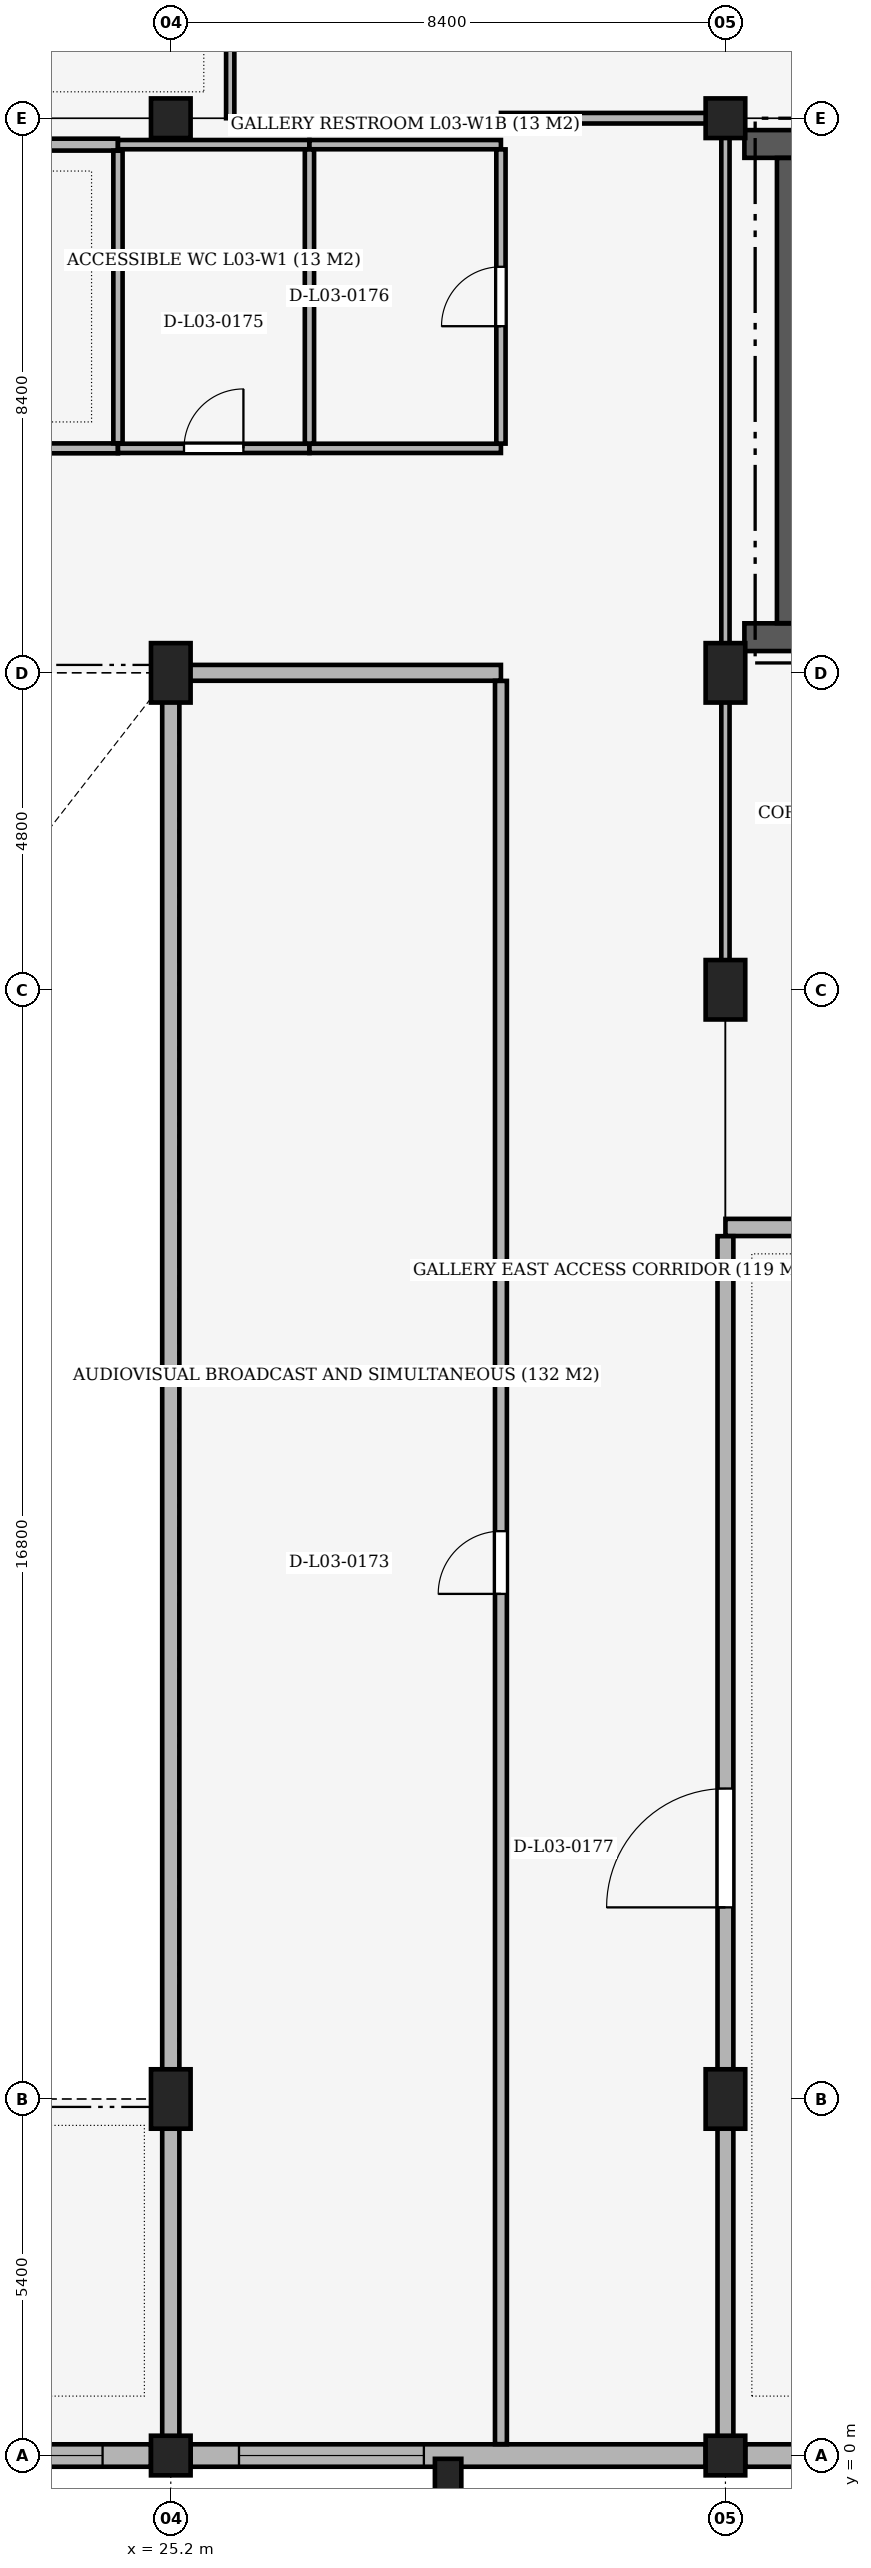
"""IFC4 building model, lengths in metres.
Left out: names, types, materials, properties, quantities, classifications, styles, units other than length and angle.
Written with IfcOpenShell. Run it as: python <this file> out.ifc"""

import sys

from ifc_helpers import new_model, si_unit, direction, frame, frame_2d, origin, origin_2d, place, context, subcontext, project, spatial, rectangle, extrude, element, fill, save


model = new_model("IFC4")
c1 = context("Model", 3, precision=1e-05, world=origin(), true_north=direction((0.0, 1.0)))
c2 = subcontext(c1, "Body", "Model", "MODEL_VIEW")
j1 = project(units=[si_unit("LENGTHUNIT", "METRE"), si_unit("PLANEANGLEUNIT", "RADIAN")], contexts=[c1])
p1 = place(None, origin())
s1 = spatial("IfcSite", under=j1, at=p1, CompositionType="ELEMENT")
p2 = place(p1, origin())
s2 = spatial("IfcBuilding", under=s1, at=p2, CompositionType="ELEMENT")
p3 = place(p2, frame((0.0, 0.0, 15.3)))
s3 = spatial("IfcBuildingStorey", under=s2, at=p3, CompositionType="ELEMENT", Elevation=15.3)
p4 = place(p3, frame((25.2, 0.0, 0.0), z_axis=(0.0, 0.0, 1.0), x_axis=(1.0, 0.0, 0.0)))
e1 = element("IfcColumn", 1, at=p4, inside=s3, PredefinedType="COLUMN", context=c2, shape_type="SweptSolid", body=[
    extrude(rectangle(XDim=0.6, YDim=0.6, at=origin_2d()), origin(), (0.0, 0.0, 1.0), 5.1),
])
for number, where, z_axis, x_axis in (
    (2, (25.2, 5.4, 0.0), (0.0, 0.0, 1.0), (1.0, 0.0, 0.0)),
    (3, (25.2, 27.0, 0.0), (0.0, 0.0, 1.0), (1.0, 0.0, 0.0)),
):
    element("IfcColumn", number, at=place(p3, frame(where, z_axis=z_axis, x_axis=x_axis)), inside=s3, PredefinedType="COLUMN", context=c2, shape_type="SweptSolid", body=[
        extrude(rectangle(XDim=0.6, YDim=0.9, at=origin_2d()), origin(), (0.0, 0.0, 1.0), 5.1),
    ])
for number, where, z_axis, x_axis in (
    (4, (25.2, 35.4, 0.0), (0.0, 0.0, 1.0), (1.0, 0.0, 0.0)),
    (5, (33.6, 0.0, 0.0), (0.0, 0.0, 1.0), (1.0, 0.0, 0.0)),
):
    element("IfcColumn", number, at=place(p3, frame(where, z_axis=z_axis, x_axis=x_axis)), inside=s3, PredefinedType="COLUMN", context=c2, shape_type="SweptSolid", body=[
        extrude(rectangle(XDim=0.6, YDim=0.6, at=origin_2d()), origin(), (0.0, 0.0, 1.0), 5.1),
    ])
for number, where, z_axis, x_axis in (
    (6, (33.6, 5.4, 0.0), (0.0, 0.0, 1.0), (1.0, 0.0, 0.0)),
    (7, (33.6, 22.2, 0.0), (0.0, 0.0, 1.0), (1.0, 0.0, 0.0)),
    (8, (33.6, 27.0, 0.0), (0.0, 0.0, 1.0), (1.0, 0.0, 0.0)),
):
    element("IfcColumn", number, at=place(p3, frame(where, z_axis=z_axis, x_axis=x_axis)), inside=s3, PredefinedType="COLUMN", context=c2, shape_type="SweptSolid", body=[
        extrude(rectangle(XDim=0.6, YDim=0.9, at=origin_2d()), origin(), (0.0, 0.0, 1.0), 5.1),
    ])
p5 = place(p3, frame((33.6, 35.4, 0.0), z_axis=(0.0, 0.0, 1.0), x_axis=(1.0, 0.0, 0.0)))
e9 = element("IfcColumn", 9, at=p5, inside=s3, PredefinedType="COLUMN", context=c2, shape_type="SweptSolid", body=[
    extrude(rectangle(XDim=0.6, YDim=0.6, at=origin_2d()), origin(), (0.0, 0.0, 1.0), 5.1),
])
p6 = place(p3, frame((29.4, -0.35, 0.0), z_axis=(0.0, 0.0, 1.0), x_axis=(1.0, 0.0, 0.0)))
e10 = element("IfcColumn", 10, at=p6, inside=s3, PredefinedType="PILASTER", context=c2, shape_type="SweptSolid", body=[
    extrude(rectangle(XDim=0.4, YDim=0.6, at=origin_2d()), origin(), (0.0, 0.0, 1.0), 5.1),
])
p7 = place(p3, frame((41.7, 0.0, 0.0), z_axis=(0.0, 0.0, 1.0), x_axis=(-1.0, 0.0, 0.0)))
e11 = element("IfcWall", 11, at=p7, inside=s3, PredefinedType="SOLIDWALL", context=c2, shape_type="SweptSolid", body=[
    extrude(rectangle(XDim=7.8, YDim=0.34, at=frame_2d((3.9, 0.0))), origin(), (0.0, 0.0, 1.0), 4.14),
])
p8 = place(p7, frame((1.0, 0.0, 0.85)))
e12 = element("IfcOpeningElement", 12, at=p8, cuts=e11, PredefinedType="OPENING", context=c2, shape_type="SweptSolid", body=[
    extrude(rectangle(XDim=2.4, YDim=2.4, at=frame_2d((1.2, 1.2))), frame((0.0, 0.185, 0.0), z_axis=(0.0, -1.0, 0.0), x_axis=(1.0, 0.0, 0.0)), (0.0, 0.0, 1.0), 0.37),
])
p9 = place(p7, frame((4.4, 0.0, 0.85)))
e13 = element("IfcOpeningElement", 13, at=p9, cuts=e11, PredefinedType="OPENING", context=c2, shape_type="SweptSolid", body=[
    extrude(rectangle(XDim=2.4, YDim=2.4, at=frame_2d((1.2, 1.2))), frame((0.0, 0.185, 0.0), z_axis=(0.0, -1.0, 0.0), x_axis=(1.0, 0.0, 0.0)), (0.0, 0.0, 1.0), 0.37),
])
p10 = place(p3, frame((33.3, 0.0, 0.0), z_axis=(0.0, 0.0, 1.0), x_axis=(-1.0, 0.0, 0.0)))
e14 = element("IfcWall", 14, at=p10, inside=s3, PredefinedType="SOLIDWALL", context=c2, shape_type="SweptSolid", body=[
    extrude(rectangle(XDim=7.8, YDim=0.34, at=frame_2d((3.9, 0.0))), origin(), (0.0, 0.0, 1.0), 4.14),
])
p11 = place(p10, frame((4.267, 0.0, 0.75)))
e15 = element("IfcOpeningElement", 15, at=p11, cuts=e14, PredefinedType="OPENING", context=c2, shape_type="SweptSolid", body=[
    extrude(rectangle(XDim=2.8, YDim=2.6, at=frame_2d((1.4, 1.3))), frame((0.0, 0.185, 0.0), z_axis=(0.0, -1.0, 0.0), x_axis=(1.0, 0.0, 0.0)), (0.0, 0.0, 1.0), 0.37),
])
p12 = place(p3, frame((24.9, 0.0, 0.0), z_axis=(0.0, 0.0, 1.0), x_axis=(-1.0, 0.0, 0.0)))
e16 = element("IfcWall", 16, at=p12, inside=s3, PredefinedType="SOLIDWALL", context=c2, shape_type="SweptSolid", body=[
    extrude(rectangle(XDim=7.8, YDim=0.34, at=frame_2d((3.9, 0.0))), origin(), (0.0, 0.0, 1.0), 4.14),
])
p13 = place(p12, frame((0.733, 0.0, 0.75)))
e17 = element("IfcOpeningElement", 17, at=p13, cuts=e16, PredefinedType="OPENING", context=c2, shape_type="SweptSolid", body=[
    extrude(rectangle(XDim=2.8, YDim=2.6, at=frame_2d((1.4, 1.3))), frame((0.0, 0.185, 0.0), z_axis=(0.0, -1.0, 0.0), x_axis=(1.0, 0.0, 0.0)), (0.0, 0.0, 1.0), 0.37),
])
p14 = place(p12, frame((4.267, 0.0, 0.75)))
e18 = element("IfcOpeningElement", 18, at=p14, cuts=e16, PredefinedType="OPENING", context=c2, shape_type="SweptSolid", body=[
    extrude(rectangle(XDim=2.8, YDim=2.6, at=frame_2d((1.4, 1.3))), frame((0.0, 0.185, 0.0), z_axis=(0.0, -1.0, 0.0), x_axis=(1.0, 0.0, 0.0)), (0.0, 0.0, 1.0), 0.37),
])
p15 = place(p3, frame((33.887, 35.01, 0.0), z_axis=(0.0, 0.0, 1.0), x_axis=(1.0, 0.0, 0.0)))
e19 = element("IfcWall", 19, at=p15, inside=s3, PredefinedType="SHEAR", context=c2, shape_type="SweptSolid", body=[
    extrude(rectangle(XDim=4.733, YDim=0.42, at=frame_2d((2.367, 0.0))), origin(), (0.0, 0.0, 1.0), 4.84),
])
p16 = place(p3, frame((33.887, 27.54, 0.0), z_axis=(0.0, 0.0, 1.0), x_axis=(1.0, 0.0, 0.0)))
e20 = element("IfcWall", 20, at=p16, inside=s3, PredefinedType="SHEAR", context=c2, shape_type="SweptSolid", body=[
    extrude(rectangle(XDim=4.733, YDim=0.42, at=frame_2d((2.367, 0.0))), origin(), (0.0, 0.0, 1.0), 4.84),
])
p17 = place(p16, frame((2.013, 0.0, 0.0)))
e21 = element("IfcOpeningElement", 21, at=p17, cuts=e20, PredefinedType="OPENING", context=c2, shape_type="SweptSolid", body=[
    extrude(rectangle(XDim=1.2, YDim=2.2, at=frame_2d((0.6, 1.1))), frame((0.0, 0.225, 0.0), z_axis=(0.0, -1.0, 0.0), x_axis=(1.0, 0.0, 0.0)), (0.0, 0.0, 1.0), 0.45),
])
p18 = place(p3, frame((34.59, 27.752, 0.0), z_axis=(0.0, 0.0, 1.0), x_axis=(0.0, 1.0, 0.0)))
e22 = element("IfcWall", 22, at=p18, inside=s3, PredefinedType="SHEAR", context=c2, shape_type="SweptSolid", body=[
    extrude(rectangle(XDim=7.046, YDim=0.42, at=frame_2d((3.523, 0.0))), origin(), (0.0, 0.0, 1.0), 4.84),
])
p19 = place(p3, frame((33.6, 18.6, 0.0), z_axis=(0.0, 0.0, 1.0), x_axis=(1.0, 0.0, 0.0)))
e23 = element("IfcWall", 23, at=p19, inside=s3, PredefinedType="PARTITIONING", context=c2, shape_type="SweptSolid", body=[
    extrude(rectangle(XDim=16.8, YDim=0.26, at=frame_2d((8.4, 0.0))), origin(), (0.0, 0.0, 1.0), 3.79),
])
p20 = place(p3, frame((25.2, 27.0, 0.0), z_axis=(0.0, 0.0, 1.0), x_axis=(1.0, 0.0, 0.0)))
e24 = element("IfcWall", 24, at=p20, inside=s3, PredefinedType="PARTITIONING", context=c2, shape_type="SweptSolid", body=[
    extrude(rectangle(XDim=5.0, YDim=0.24, at=frame_2d((2.5, 0.0))), origin(), (0.0, 0.0, 1.0), 3.59),
])
p21 = place(p3, frame((8.4, 30.4, 0.0), z_axis=(0.0, 0.0, 1.0), x_axis=(1.0, 0.0, 0.0)))
e25 = element("IfcWall", 25, at=p21, inside=s3, PredefinedType="PARTITIONING", context=c2, shape_type="SweptSolid", body=[
    extrude(rectangle(XDim=16.0, YDim=0.15, at=frame_2d((8.0, 0.0))), origin(), (0.0, 0.0, 1.0), 4.14),
])
p22 = place(p21, frame((7.2, 0.0, 0.0)))
e26 = element("IfcOpeningElement", 26, at=p22, cuts=e25, PredefinedType="OPENING", context=c2, shape_type="SweptSolid", body=[
    extrude(rectangle(XDim=1.6, YDim=2.3, at=frame_2d((0.8, 1.15))), frame((0.0, 0.09, 0.0), z_axis=(0.0, -1.0, 0.0), x_axis=(1.0, 0.0, 0.0)), (0.0, 0.0, 1.0), 0.18),
])
p23 = place(p3, frame((24.4, 30.4, 0.0), z_axis=(0.0, 0.0, 1.0), x_axis=(1.0, 0.0, 0.0)))
e27 = element("IfcWall", 27, at=p23, inside=s3, PredefinedType="PARTITIONING", context=c2, shape_type="SweptSolid", body=[
    extrude(rectangle(XDim=2.9, YDim=0.14, at=frame_2d((1.45, 0.0))), origin(), (0.0, 0.0, 1.0), 4.14),
])
p24 = place(p23, frame((1.0, 0.0, 0.0)))
e28 = element("IfcOpeningElement", 28, at=p24, cuts=e27, PredefinedType="OPENING", context=c2, shape_type="SweptSolid", body=[
    extrude(rectangle(XDim=0.9, YDim=2.1, at=frame_2d((0.45, 1.05))), frame((0.0, 0.085, 0.0), z_axis=(0.0, -1.0, 0.0), x_axis=(1.0, 0.0, 0.0)), (0.0, 0.0, 1.0), 0.17),
])
p25 = place(p3, frame((27.3, 30.4, 0.0), z_axis=(0.0, 0.0, 1.0), x_axis=(1.0, 0.0, 0.0)))
e29 = element("IfcWall", 29, at=p25, inside=s3, PredefinedType="PARTITIONING", context=c2, shape_type="SweptSolid", body=[
    extrude(rectangle(XDim=2.9, YDim=0.14, at=frame_2d((1.45, 0.0))), origin(), (0.0, 0.0, 1.0), 4.84),
])
p26 = place(p3, frame((8.4, 35.0, 0.0), z_axis=(0.0, 0.0, 1.0), x_axis=(1.0, 0.0, 0.0)))
e30 = element("IfcWall", 30, at=p26, inside=s3, PredefinedType="PARTITIONING", context=c2, shape_type="SweptSolid", body=[
    extrude(rectangle(XDim=16.0, YDim=0.18, at=frame_2d((8.0, 0.0))), origin(), (0.0, 0.0, 1.0), 4.14),
])
p27 = place(p3, frame((24.4, 35.0, 0.0), z_axis=(0.0, 0.0, 1.0), x_axis=(1.0, 0.0, 0.0)))
e31 = element("IfcWall", 31, at=p27, inside=s3, PredefinedType="PARTITIONING", context=c2, shape_type="SweptSolid", body=[
    extrude(rectangle(XDim=2.9, YDim=0.14, at=frame_2d((1.45, 0.0))), origin(), (0.0, 0.0, 1.0), 4.14),
])
p28 = place(p3, frame((27.3, 35.0, 0.0), z_axis=(0.0, 0.0, 1.0), x_axis=(1.0, 0.0, 0.0)))
e32 = element("IfcWall", 32, at=p28, inside=s3, PredefinedType="PARTITIONING", context=c2, shape_type="SweptSolid", body=[
    extrude(rectangle(XDim=2.9, YDim=0.14, at=frame_2d((1.45, 0.0))), origin(), (0.0, 0.0, 1.0), 4.84),
])
p29 = place(p3, frame((30.2, 35.4, 0.0), z_axis=(0.0, 0.0, 1.0), x_axis=(1.0, 0.0, 0.0)))
e33 = element("IfcWall", 33, at=p29, inside=s3, PredefinedType="PARTITIONING", context=c2, shape_type="SweptSolid", body=[
    extrude(rectangle(XDim=3.4, YDim=0.16, at=frame_2d((1.7, 0.0))), origin(), (0.0, 0.0, 1.0), 4.14),
])
p30 = place(p3, frame((24.4, 30.477, 0.0), z_axis=(0.0, 0.0, 1.0), x_axis=(0.0, 1.0, 0.0)))
e34 = element("IfcWall", 34, at=p30, inside=s3, PredefinedType="PARTITIONING", context=c2, shape_type="SweptSolid", body=[
    extrude(rectangle(XDim=4.431, YDim=0.14, at=frame_2d((2.215, 0.0))), origin(), (0.0, 0.0, 1.0), 4.84),
])
p31 = place(p3, frame((25.2, -0.064, 0.0), z_axis=(0.0, 0.0, 1.0), x_axis=(0.0, 1.0, 0.0)))
e35 = element("IfcWall", 35, at=p31, inside=s3, PredefinedType="PARTITIONING", context=c2, shape_type="SweptSolid", body=[
    extrude(rectangle(XDim=5.464, YDim=0.26, at=frame_2d((2.732, 0.0))), origin(), (0.0, 0.0, 1.0), 3.69),
])
p32 = place(p3, frame((25.2, 5.4, 0.0), z_axis=(0.0, 0.0, 1.0), x_axis=(0.0, 1.0, 0.0)))
e36 = element("IfcWall", 36, at=p32, inside=s3, PredefinedType="PARTITIONING", context=c2, shape_type="SweptSolid", body=[
    extrude(rectangle(XDim=21.478, YDim=0.26, at=frame_2d((10.739, 0.0))), origin(), (0.0, 0.0, 1.0), 3.59),
])
p33 = place(p3, frame((26.1, 35.4, 0.0), z_axis=(0.0, 0.0, 1.0), x_axis=(0.0, 1.0, 0.0)))
e37 = element("IfcWall", 37, at=p33, inside=s3, PredefinedType="PARTITIONING", context=c2, shape_type="SweptSolid", body=[
    extrude(rectangle(XDim=3.698, YDim=0.125, at=frame_2d((1.849, 0.0))), origin(), (0.0, 0.0, 1.0), 4.14),
])
p34 = place(p3, frame((27.3, 30.472, 0.0), z_axis=(0.0, 0.0, 1.0), x_axis=(0.0, 1.0, 0.0)))
e38 = element("IfcWall", 38, at=p34, inside=s3, PredefinedType="PARTITIONING", context=c2, shape_type="SweptSolid", body=[
    extrude(rectangle(XDim=4.456, YDim=0.14, at=frame_2d((2.228, 0.0))), origin(), (0.0, 0.0, 1.0), 4.54),
])
p35 = place(p3, frame((30.2, 0.172, 0.0), z_axis=(0.0, 0.0, 1.0), x_axis=(0.0, 1.0, 0.0)))
e39 = element("IfcWall", 39, at=p35, inside=s3, PredefinedType="PARTITIONING", context=c2, shape_type="SweptSolid", body=[
    extrude(rectangle(XDim=26.706, YDim=0.18, at=frame_2d((13.353, 0.0))), origin(), (0.0, 0.0, 1.0), 4.14),
])
p36 = place(p35, frame((12.878, 0.0, 0.0)))
e40 = element("IfcOpeningElement", 40, at=p36, cuts=e39, PredefinedType="OPENING", context=c2, shape_type="SweptSolid", body=[
    extrude(rectangle(XDim=0.95, YDim=2.1, at=frame_2d((0.475, 1.05))), frame((0.0, 0.105, 0.0), z_axis=(0.0, -1.0, 0.0), x_axis=(1.0, 0.0, 0.0)), (0.0, 0.0, 1.0), 0.21),
])
p37 = place(p3, frame((30.2, 30.472, 0.0), z_axis=(0.0, 0.0, 1.0), x_axis=(0.0, 1.0, 0.0)))
e41 = element("IfcWall", 41, at=p37, inside=s3, PredefinedType="PARTITIONING", context=c2, shape_type="SweptSolid", body=[
    extrude(rectangle(XDim=4.456, YDim=0.14, at=frame_2d((2.228, 0.0))), origin(), (0.0, 0.0, 1.0), 4.54),
])
p38 = place(p37, frame((1.778, 0.0, 0.0)))
e42 = element("IfcOpeningElement", 42, at=p38, cuts=e41, PredefinedType="OPENING", context=c2, shape_type="SweptSolid", body=[
    extrude(rectangle(XDim=0.9, YDim=2.1, at=frame_2d((0.45, 1.05))), frame((0.0, 0.085, 0.0), z_axis=(0.0, -1.0, 0.0), x_axis=(1.0, 0.0, 0.0)), (0.0, 0.0, 1.0), 0.17),
])
p39 = place(p3, frame((33.6, 22.2, 0.0), z_axis=(0.0, 0.0, 1.0), x_axis=(0.0, 1.0, 0.0)))
e43 = element("IfcWall", 43, at=p39, inside=s3, PredefinedType="PARTITIONING", context=c2, shape_type="SweptSolid", body=[
    extrude(rectangle(XDim=13.118, YDim=0.125, at=frame_2d((6.559, 0.0))), origin(), (0.0, 0.0, 1.0), 4.14),
])
p40 = place(p3, frame((33.6, -0.064, 0.0), z_axis=(0.0, 0.0, 1.0), x_axis=(0.0, 1.0, 0.0)))
e44 = element("IfcWall", 44, at=p40, inside=s3, PredefinedType="PARTITIONING", context=c2, shape_type="SweptSolid", body=[
    extrude(rectangle(XDim=18.532, YDim=0.24, at=frame_2d((9.266, 0.0))), origin(), (0.0, 0.0, 1.0), 3.79),
])
p41 = place(p40, frame((8.366, 0.0, 0.0)))
e45 = element("IfcOpeningElement", 45, at=p41, cuts=e44, PredefinedType="OPENING", context=c2, shape_type="SweptSolid", body=[
    extrude(rectangle(XDim=1.8, YDim=2.4, at=frame_2d((0.9, 1.2))), frame((0.0, 0.135, 0.0), z_axis=(0.0, -1.0, 0.0), x_axis=(1.0, 0.0, 0.0)), (0.0, 0.0, 1.0), 0.27),
])
p42 = place(p11, origin())
e46 = element("IfcWindow", 46, at=p42, inside=s3, PartitioningType="SINGLE_PANEL", PredefinedType="WINDOW", context=c2, shape_type="SweptSolid", body=[
    extrude(rectangle(XDim=2.8, YDim=2.6, at=frame_2d((1.4, 1.3))), frame((0.0, 0.03, 0.0), z_axis=(0.0, -1.0, 0.0), x_axis=(1.0, 0.0, 0.0)), (0.0, 0.0, 1.0), 0.06),
])
fill(e15, e46)
p43 = place(p13, origin())
e47 = element("IfcWindow", 47, at=p43, inside=s3, PartitioningType="SINGLE_PANEL", PredefinedType="WINDOW", context=c2, shape_type="SweptSolid", body=[
    extrude(rectangle(XDim=2.8, YDim=2.6, at=frame_2d((1.4, 1.3))), frame((0.0, 0.03, 0.0), z_axis=(0.0, -1.0, 0.0), x_axis=(1.0, 0.0, 0.0)), (0.0, 0.0, 1.0), 0.06),
])
fill(e17, e47)
p44 = place(p36, origin())
e48 = element("IfcDoor", 48, at=p44, inside=s3, OperationType="SINGLE_SWING_LEFT", PredefinedType="DOOR", context=c2, shape_type="SweptSolid", body=[
    extrude(rectangle(XDim=0.95, YDim=2.1, at=frame_2d((0.475, 1.05))), frame((0.0, 0.025, 0.0), z_axis=(0.0, -1.0, 0.0), x_axis=(1.0, 0.0, 0.0)), (0.0, 0.0, 1.0), 0.05),
])
fill(e40, e48)
p45 = place(p24, origin())
e49 = element("IfcDoor", 49, at=p45, inside=s3, OperationType="SINGLE_SWING_RIGHT", PredefinedType="DOOR", context=c2, shape_type="SweptSolid", body=[
    extrude(rectangle(XDim=0.9, YDim=2.1, at=frame_2d((0.45, 1.05))), frame((0.0, 0.025, 0.0), z_axis=(0.0, -1.0, 0.0), x_axis=(1.0, 0.0, 0.0)), (0.0, 0.0, 1.0), 0.05),
])
fill(e28, e49)
p46 = place(p38, origin())
e50 = element("IfcDoor", 50, at=p46, inside=s3, OperationType="SINGLE_SWING_LEFT", PredefinedType="DOOR", context=c2, shape_type="SweptSolid", body=[
    extrude(rectangle(XDim=0.9, YDim=2.1, at=frame_2d((0.45, 1.05))), frame((0.0, 0.025, 0.0), z_axis=(0.0, -1.0, 0.0), x_axis=(1.0, 0.0, 0.0)), (0.0, 0.0, 1.0), 0.05),
])
fill(e42, e50)
p47 = place(p41, origin())
e51 = element("IfcDoor", 51, at=p47, inside=s3, OperationType="SINGLE_SWING_LEFT", PredefinedType="DOOR", context=c2, shape_type="SweptSolid", body=[
    extrude(rectangle(XDim=1.8, YDim=2.4, at=frame_2d((0.9, 1.2))), frame((0.0, 0.025, 0.0), z_axis=(0.0, -1.0, 0.0), x_axis=(1.0, 0.0, 0.0)), (0.0, 0.0, 1.0), 0.05),
])
fill(e45, e51)
save(model, sys.argv[1])
